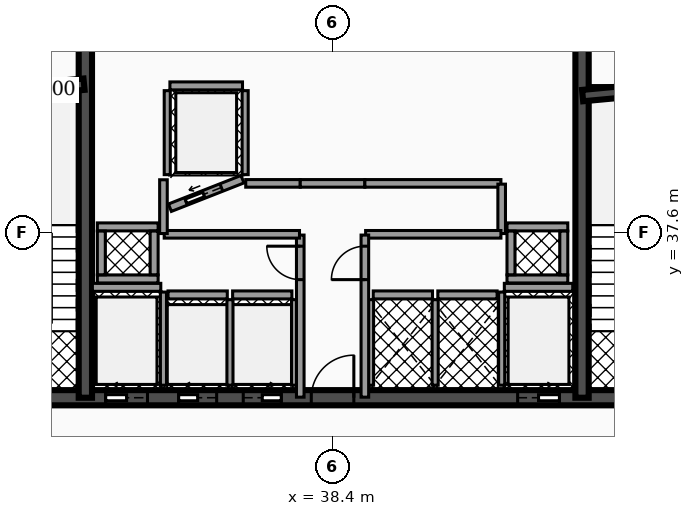
"""IFC4 building model, lengths in metres.
Left out: names, types, materials, properties, quantities, classifications, styles, units other than length and angle.
Written with IfcOpenShell. Run it as: python <this file> out.ifc"""

import sys

from ifc_helpers import new_model, si_unit, direction, frame, frame_2d, origin, place, context, subcontext, project, spatial, rectangle, extrude, element, fill, save


model = new_model("IFC4")
c1 = context("Model", 3, precision=1e-05, world=origin(), true_north=direction((0.0, 1.0)))
c2 = subcontext(c1, "Body", "Model", "MODEL_VIEW")
j1 = project(units=[si_unit("LENGTHUNIT", "METRE"), si_unit("PLANEANGLEUNIT", "RADIAN")], contexts=[c1])
p1 = place(None, origin())
s1 = spatial("IfcSite", under=j1, at=p1, CompositionType="ELEMENT")
p2 = place(p1, origin())
s2 = spatial("IfcBuilding", under=s1, at=p2, CompositionType="ELEMENT")
p3 = place(p2, frame((0.0, 0.0, 179.52)))
s3 = spatial("IfcBuildingStorey", under=s2, at=p3, CompositionType="ELEMENT", Elevation=179.52)
p4 = place(p3, frame((28.4, 33.25, 0.0), z_axis=(0.0, 0.0, 1.0), x_axis=(1.0, 0.0, 0.0)))
e1 = element("IfcWall", 1, at=p4, inside=s3, PredefinedType="SHEAR", context=c2, shape_type="SweptSolid", body=[
    extrude(rectangle(XDim=20.06, YDim=0.4, at=frame_2d((10.03, 0.0))), origin(), (0.0, 0.0, 1.0), 3.5),
])
p5 = place(p4, frame((4.03, 0.0, 0.0)))
e2 = element("IfcOpeningElement", 2, at=p5, cuts=e1, PredefinedType="OPENING", context=c2, shape_type="SweptSolid", body=[
    extrude(rectangle(XDim=1.1, YDim=2.15, at=frame_2d((0.55, 1.075))), frame((0.0, 0.21, 0.0), z_axis=(0.0, -1.0, 0.0), x_axis=(1.0, 0.0, 0.0)), (0.0, 0.0, 1.0), 0.42),
])
p6 = place(p4, frame((14.87, 0.0, 0.0)))
e3 = element("IfcOpeningElement", 3, at=p6, cuts=e1, PredefinedType="OPENING", context=c2, shape_type="SweptSolid", body=[
    extrude(rectangle(XDim=1.1, YDim=2.15, at=frame_2d((0.55, 1.075))), frame((0.0, 0.21, 0.0), z_axis=(0.0, -1.0, 0.0), x_axis=(1.0, 0.0, 0.0)), (0.0, 0.0, 1.0), 0.42),
])
p7 = place(p4, frame((5.95, 0.0, 0.0)))
e4 = element("IfcOpeningElement", 4, at=p7, cuts=e1, PredefinedType="OPENING", context=c2, shape_type="SweptSolid", body=[
    extrude(rectangle(XDim=1.0, YDim=2.1, at=frame_2d((0.5, 1.05))), frame((0.0, 0.21, 0.0), z_axis=(0.0, -1.0, 0.0), x_axis=(1.0, 0.0, 0.0)), (0.0, 0.0, 1.0), 0.42),
])
p8 = place(p4, frame((7.65, 0.0, 0.0)))
e5 = element("IfcOpeningElement", 5, at=p8, cuts=e1, PredefinedType="OPENING", context=c2, shape_type="SweptSolid", body=[
    extrude(rectangle(XDim=1.0, YDim=2.1, at=frame_2d((0.5, 1.05))), frame((0.0, 0.21, 0.0), z_axis=(0.0, -1.0, 0.0), x_axis=(1.0, 0.0, 0.0)), (0.0, 0.0, 1.0), 0.42),
])
p9 = place(p4, frame((1.31, 0.0, 0.0)))
e6 = element("IfcOpeningElement", 6, at=p9, cuts=e1, PredefinedType="OPENING", context=c2, shape_type="SweptSolid", body=[
    extrude(rectangle(XDim=1.1, YDim=2.2, at=frame_2d((0.55, 1.1))), frame((0.0, 0.21, 0.0), z_axis=(0.0, -1.0, 0.0), x_axis=(1.0, 0.0, 0.0)), (0.0, 0.0, 1.0), 0.42),
])
p10 = place(p4, frame((9.44, 0.0, 0.0)))
e7 = element("IfcOpeningElement", 7, at=p10, cuts=e1, PredefinedType="OPENING", context=c2, shape_type="SweptSolid", body=[
    extrude(rectangle(XDim=1.12, YDim=2.05, at=frame_2d((0.56, 1.025))), frame((0.0, 0.21, 0.0), z_axis=(0.0, -1.0, 0.0), x_axis=(1.0, 0.0, 0.0)), (0.0, 0.0, 1.0), 0.42),
])
p11 = place(p4, frame((17.65, 0.0, 0.0)))
e8 = element("IfcOpeningElement", 8, at=p11, cuts=e1, PredefinedType="OPENING", context=c2, shape_type="SweptSolid", body=[
    extrude(rectangle(XDim=1.1, YDim=2.2, at=frame_2d((0.55, 1.1))), frame((0.0, 0.21, 0.0), z_axis=(0.0, -1.0, 0.0), x_axis=(1.0, 0.0, 0.0)), (0.0, 0.0, 1.0), 0.42),
])
for number, where, z_axis, x_axis in (
    (9, (31.895, 33.25, 0.0), (0.0, 0.0, 1.0), (0.0, 1.0, 0.0)),
    (10, (44.965, 33.25, 0.0), (0.0, 0.0, 1.0), (0.0, 1.0, 0.0)),
):
    element("IfcWall", number, at=place(p3, frame(where, z_axis=z_axis, x_axis=x_axis)), inside=s3, PredefinedType="SHEAR", context=c2, shape_type="SweptSolid", body=[
        extrude(rectangle(XDim=10.2, YDim=0.35, at=frame_2d((5.1, 0.0))), origin(), (0.0, 0.0, 1.0), 3.5),
    ])
p12 = place(p3, frame((28.64, 41.2, 0.0), z_axis=(0.0, 0.0, 1.0), x_axis=(0.995687118776, 0.092774789157, 0.0)))
e11 = element("IfcWall", 11, at=p12, inside=s3, PredefinedType="SHEAR", context=c2, shape_type="SweptSolid", body=[
    extrude(rectangle(XDim=3.234, YDim=0.3, at=frame_2d((1.617, 0.0))), origin(), (0.0, 0.0, 1.0), 3.5),
])
p13 = place(p3, frame((44.98, 41.2, 0.0), z_axis=(0.0, 0.0, 1.0), x_axis=(0.995686468965, 0.09278176286, 0.0)))
e12 = element("IfcWall", 12, at=p13, inside=s3, PredefinedType="SHEAR", context=c2, shape_type="SweptSolid", body=[
    extrude(rectangle(XDim=3.234, YDim=0.3, at=frame_2d((1.617, 0.0))), origin(), (0.0, 0.0, 1.0), 3.5),
])
p14 = place(p3, frame((32.08, 36.155, 0.0), z_axis=(0.0, 0.0, 1.0), x_axis=(1.0, 0.0, 0.0)))
e13 = element("IfcWall", 13, at=p14, inside=s3, PredefinedType="SOLIDWALL", context=c2, shape_type="SweptSolid", body=[
    extrude(rectangle(XDim=1.8, YDim=0.21, at=frame_2d((0.9, 0.0))), origin(), (0.0, 0.0, 1.0), 2.472),
])
p15 = place(p3, frame((33.95, 33.58, 0.0), z_axis=(0.0, 0.0, 1.0), x_axis=(0.0, 1.0, 0.0)))
e14 = element("IfcWall", 14, at=p15, inside=s3, PredefinedType="SOLIDWALL", context=c2, shape_type="SweptSolid", body=[
    extrude(rectangle(XDim=2.45, YDim=0.16, at=frame_2d((1.225, 0.0))), origin(), (0.0, 0.0, 1.0), 2.472),
])
p16 = place(p3, frame((42.92, 36.155, 0.0), z_axis=(0.0, 0.0, 1.0), x_axis=(1.0, 0.0, 0.0)))
e15 = element("IfcWall", 15, at=p16, inside=s3, PredefinedType="SOLIDWALL", context=c2, shape_type="SweptSolid", body=[
    extrude(rectangle(XDim=1.8, YDim=0.21, at=frame_2d((0.9, 0.0))), origin(), (0.0, 0.0, 1.0), 2.472),
])
p17 = place(p3, frame((42.85, 33.58, 0.0), z_axis=(0.0, 0.0, 1.0), x_axis=(0.0, 1.0, 0.0)))
e16 = element("IfcWall", 16, at=p17, inside=s3, PredefinedType="SOLIDWALL", context=c2, shape_type="SweptSolid", body=[
    extrude(rectangle(XDim=2.45, YDim=0.16, at=frame_2d((1.225, 0.0))), origin(), (0.0, 0.0, 1.0), 2.472),
])
p18 = place(p3, frame((34.07, 35.955, 0.0), z_axis=(0.0, 0.0, 1.0), x_axis=(1.0, 0.0, 0.0)))
e17 = element("IfcWall", 17, at=p18, inside=s3, PredefinedType="SOLIDWALL", context=c2, shape_type="SweptSolid", body=[
    extrude(rectangle(XDim=1.56, YDim=0.21, at=frame_2d((0.78, 0.0))), origin(), (0.0, 0.0, 1.0), 2.472),
])
p19 = place(p3, frame((35.7, 33.58, 0.0), z_axis=(0.0, 0.0, 1.0), x_axis=(0.0, 1.0, 0.0)))
e18 = element("IfcWall", 18, at=p19, inside=s3, PredefinedType="SOLIDWALL", context=c2, shape_type="SweptSolid", body=[
    extrude(rectangle(XDim=2.25, YDim=0.16, at=frame_2d((1.125, 0.0))), origin(), (0.0, 0.0, 1.0), 2.472),
])
p20 = place(p3, frame((35.77, 35.955, 0.0), z_axis=(0.0, 0.0, 1.0), x_axis=(1.0, 0.0, 0.0)))
e19 = element("IfcWall", 19, at=p20, inside=s3, PredefinedType="SOLIDWALL", context=c2, shape_type="SweptSolid", body=[
    extrude(rectangle(XDim=1.56, YDim=0.21, at=frame_2d((0.78, 0.0))), origin(), (0.0, 0.0, 1.0), 2.472),
])
p21 = place(p3, frame((37.4, 33.58, 0.0), z_axis=(0.0, 0.0, 1.0), x_axis=(0.0, 1.0, 0.0)))
e20 = element("IfcWall", 20, at=p21, inside=s3, PredefinedType="SOLIDWALL", context=c2, shape_type="SweptSolid", body=[
    extrude(rectangle(XDim=2.25, YDim=0.16, at=frame_2d((1.125, 0.0))), origin(), (0.0, 0.0, 1.0), 2.472),
])
p22 = place(p3, frame((34.12, 38.25, 0.0), z_axis=(0.0, 0.0, 1.0), x_axis=(0.930804993012, 0.36551616241, 0.0)))
e21 = element("IfcWall", 21, at=p22, inside=s3, PredefinedType="SOLIDWALL", context=c2, shape_type="SweptSolid", body=[
    extrude(rectangle(XDim=2.052, YDim=0.21, at=frame_2d((1.026, 0.0))), origin(), (0.0, 0.0, 1.0), 2.472),
])
p23 = place(p22, frame((0.455, 0.0, 0.0)))
e22 = element("IfcOpeningElement", 22, at=p23, cuts=e21, PredefinedType="OPENING", context=c2, shape_type="SweptSolid", body=[
    extrude(rectangle(XDim=1.0, YDim=2.1, at=frame_2d((0.5, 1.05))), frame((0.0, 0.115, 0.0), z_axis=(0.0, -1.0, 0.0), x_axis=(1.0, 0.0, 0.0)), (0.0, 0.0, 1.0), 0.23),
])
p24 = place(p3, frame((34.12, 41.455, 0.0), z_axis=(0.0, 0.0, 1.0), x_axis=(1.0, 0.0, 0.0)))
e23 = element("IfcWall", 23, at=p24, inside=s3, PredefinedType="SOLIDWALL", context=c2, shape_type="SweptSolid", body=[
    extrude(rectangle(XDim=1.91, YDim=0.21, at=frame_2d((0.955, 0.0))), origin(), (0.0, 0.0, 1.0), 2.472),
])
for number, where, z_axis, x_axis in (
    (24, (34.05, 39.12, 0.0), (0.0, 0.0, 1.0), (0.0, 1.0, 0.0)),
    (25, (36.1, 39.12, 0.0), (0.0, 0.0, 1.0), (0.0, 1.0, 0.0)),
):
    element("IfcWall", number, at=place(p3, frame(where, z_axis=z_axis, x_axis=x_axis)), inside=s3, PredefinedType="SOLIDWALL", context=c2, shape_type="SweptSolid", body=[
        extrude(rectangle(XDim=2.21, YDim=0.16, at=frame_2d((1.105, 0.0))), origin(), (0.0, 0.0, 1.0), 2.472),
    ])
p25 = place(p3, frame((39.47, 35.955, 0.0), z_axis=(0.0, 0.0, 1.0), x_axis=(1.0, 0.0, 0.0)))
e26 = element("IfcWall", 26, at=p25, inside=s3, PredefinedType="SOLIDWALL", context=c2, shape_type="SweptSolid", body=[
    extrude(rectangle(XDim=1.56, YDim=0.21, at=frame_2d((0.78, 0.0))), origin(), (0.0, 0.0, 1.0), 2.472),
])
for number, where, z_axis, x_axis in (
    (27, (39.4, 33.58, 0.0), (0.0, 0.0, 1.0), (0.0, 1.0, 0.0)),
    (28, (41.1, 33.58, 0.0), (0.0, 0.0, 1.0), (0.0, 1.0, 0.0)),
):
    element("IfcWall", number, at=place(p3, frame(where, z_axis=z_axis, x_axis=x_axis)), inside=s3, PredefinedType="SOLIDWALL", context=c2, shape_type="SweptSolid", body=[
        extrude(rectangle(XDim=2.25, YDim=0.16, at=frame_2d((1.125, 0.0))), origin(), (0.0, 0.0, 1.0), 2.472),
    ])
p26 = place(p3, frame((41.17, 35.955, 0.0), z_axis=(0.0, 0.0, 1.0), x_axis=(1.0, 0.0, 0.0)))
e29 = element("IfcWall", 29, at=p26, inside=s3, PredefinedType="SOLIDWALL", context=c2, shape_type="SweptSolid", body=[
    extrude(rectangle(XDim=1.56, YDim=0.21, at=frame_2d((0.78, 0.0))), origin(), (0.0, 0.0, 1.0), 2.472),
])
for number, where, z_axis, x_axis in (
    (30, (32.21, 36.375, 0.0), (0.0, 0.0, 1.0), (1.0, 0.0, 0.0)),
    (31, (32.21, 37.745, 0.0), (0.0, 0.0, 1.0), (1.0, 0.0, 0.0)),
):
    element("IfcWall", number, at=place(p3, frame(where, z_axis=z_axis, x_axis=x_axis)), inside=s3, PredefinedType="SOLIDWALL", context=c2, shape_type="SweptSolid", body=[
        extrude(rectangle(XDim=1.6, YDim=0.21, at=frame_2d((0.8, 0.0))), origin(), (0.0, 0.0, 1.0), 3.5),
    ])
for number, where, z_axis, x_axis in (
    (32, (32.315, 36.485, 0.0), (0.0, 0.0, 1.0), (0.0, 1.0, 0.0)),
    (33, (33.705, 36.485, 0.0), (0.0, 0.0, 1.0), (0.0, 1.0, 0.0)),
):
    element("IfcWall", number, at=place(p3, frame(where, z_axis=z_axis, x_axis=x_axis)), inside=s3, PredefinedType="SOLIDWALL", context=c2, shape_type="SweptSolid", body=[
        extrude(rectangle(XDim=1.15, YDim=0.21, at=frame_2d((0.575, 0.0))), origin(), (0.0, 0.0, 1.0), 3.5),
    ])
for number, where, z_axis, x_axis in (
    (34, (42.99, 36.375, 0.0), (0.0, 0.0, 1.0), (1.0, 0.0, 0.0)),
    (35, (42.99, 37.745, 0.0), (0.0, 0.0, 1.0), (1.0, 0.0, 0.0)),
):
    element("IfcWall", number, at=place(p3, frame(where, z_axis=z_axis, x_axis=x_axis)), inside=s3, PredefinedType="SOLIDWALL", context=c2, shape_type="SweptSolid", body=[
        extrude(rectangle(XDim=1.6, YDim=0.21, at=frame_2d((0.8, 0.0))), origin(), (0.0, 0.0, 1.0), 3.5),
    ])
for number, where, z_axis, x_axis in (
    (36, (43.095, 36.485, 0.0), (0.0, 0.0, 1.0), (0.0, 1.0, 0.0)),
    (37, (44.485, 36.485, 0.0), (0.0, 0.0, 1.0), (0.0, 1.0, 0.0)),
):
    element("IfcWall", number, at=place(p3, frame(where, z_axis=z_axis, x_axis=x_axis)), inside=s3, PredefinedType="SOLIDWALL", context=c2, shape_type="SweptSolid", body=[
        extrude(rectangle(XDim=1.15, YDim=0.21, at=frame_2d((0.575, 0.0))), origin(), (0.0, 0.0, 1.0), 3.5),
    ])
p27 = place(p3, frame((37.55, 33.265, 0.0), z_axis=(0.0, 0.0, 1.0), x_axis=(0.0, 1.0, 0.0)))
e38 = element("IfcWall", 38, at=p27, inside=s3, PredefinedType="PARTITIONING", context=c2, shape_type="SweptSolid", body=[
    extrude(rectangle(XDim=4.265, YDim=0.2, at=frame_2d((2.133, 0.0))), origin(), (0.0, 0.0, 1.0), 2.457),
])
p28 = place(p27, frame((3.093, 0.0, 0.0)))
e39 = element("IfcOpeningElement", 39, at=p28, cuts=e38, PredefinedType="OPENING", context=c2, shape_type="SweptSolid", body=[
    extrude(rectangle(XDim=0.88, YDim=2.05, at=frame_2d((0.44, 1.025))), frame((0.0, 0.11, 0.0), z_axis=(0.0, -1.0, 0.0), x_axis=(1.0, 0.0, 0.0)), (0.0, 0.0, 1.0), 0.22),
])
p29 = place(p3, frame((33.97, 37.55, 0.0), z_axis=(0.0, 0.0, 1.0), x_axis=(1.0, 0.0, 0.0)))
e40 = element("IfcWall", 40, at=p29, inside=s3, PredefinedType="PARTITIONING", context=c2, shape_type="SweptSolid", body=[
    extrude(rectangle(XDim=3.56, YDim=0.2, at=frame_2d((1.78, 0.0))), origin(), (0.0, 0.0, 1.0), 2.457),
])
p30 = place(p3, frame((33.95, 37.57, 0.0), z_axis=(0.0, 0.0, 1.0), x_axis=(0.0, 1.0, 0.0)))
e41 = element("IfcWall", 41, at=p30, inside=s3, PredefinedType="PARTITIONING", context=c2, shape_type="SweptSolid", body=[
    extrude(rectangle(XDim=1.415, YDim=0.2, at=frame_2d((0.708, 0.0))), origin(), (0.0, 0.0, 1.0), 2.457),
])
p31 = place(p3, frame((36.115, 38.89, 0.0), z_axis=(0.0, 0.0, 1.0), x_axis=(1.0, 0.0, 0.0)))
e42 = element("IfcWall", 42, at=p31, inside=s3, PredefinedType="PARTITIONING", context=c2, shape_type="SweptSolid", body=[
    extrude(rectangle(XDim=1.435, YDim=0.2, at=frame_2d((0.718, 0.0))), origin(), (0.0, 0.0, 1.0), 2.457),
])
p32 = place(p3, frame((37.55, 38.89, 0.0), z_axis=(0.0, 0.0, 1.0), x_axis=(1.0, 0.0, 0.0)))
e43 = element("IfcWall", 43, at=p32, inside=s3, PredefinedType="PARTITIONING", context=c2, shape_type="SweptSolid", body=[
    extrude(rectangle(XDim=1.7, YDim=0.2, at=frame_2d((0.85, 0.0))), origin(), (0.0, 0.0, 1.0), 2.457),
])
p33 = place(p3, frame((39.25, 38.89, 0.0), z_axis=(0.0, 0.0, 1.0), x_axis=(1.0, 0.0, 0.0)))
e44 = element("IfcWall", 44, at=p33, inside=s3, PredefinedType="PARTITIONING", context=c2, shape_type="SweptSolid", body=[
    extrude(rectangle(XDim=3.58, YDim=0.2, at=frame_2d((1.79, 0.0))), origin(), (0.0, 0.0, 1.0), 2.457),
])
p34 = place(p3, frame((42.85, 37.57, 0.0), z_axis=(0.0, 0.0, 1.0), x_axis=(0.0, 1.0, 0.0)))
e45 = element("IfcWall", 45, at=p34, inside=s3, PredefinedType="PARTITIONING", context=c2, shape_type="SweptSolid", body=[
    extrude(rectangle(XDim=1.3, YDim=0.2, at=frame_2d((0.65, 0.0))), origin(), (0.0, 0.0, 1.0), 2.457),
])
p35 = place(p3, frame((39.27, 37.55, 0.0), z_axis=(0.0, 0.0, 1.0), x_axis=(1.0, 0.0, 0.0)))
e46 = element("IfcWall", 46, at=p35, inside=s3, PredefinedType="PARTITIONING", context=c2, shape_type="SweptSolid", body=[
    extrude(rectangle(XDim=3.56, YDim=0.2, at=frame_2d((1.78, 0.0))), origin(), (0.0, 0.0, 1.0), 2.457),
])
p36 = place(p3, frame((39.25, 33.265, 0.0), z_axis=(0.0, 0.0, 1.0), x_axis=(0.0, 1.0, 0.0)))
e47 = element("IfcWall", 47, at=p36, inside=s3, PredefinedType="PARTITIONING", context=c2, shape_type="SweptSolid", body=[
    extrude(rectangle(XDim=4.265, YDim=0.2, at=frame_2d((2.133, 0.0))), origin(), (0.0, 0.0, 1.0), 2.457),
])
p37 = place(p36, frame((3.093, 0.0, 0.0)))
e48 = element("IfcOpeningElement", 48, at=p37, cuts=e47, PredefinedType="OPENING", context=c2, shape_type="SweptSolid", body=[
    extrude(rectangle(XDim=0.88, YDim=2.05, at=frame_2d((0.44, 1.025))), frame((0.0, 0.11, 0.0), z_axis=(0.0, -1.0, 0.0), x_axis=(1.0, 0.0, 0.0)), (0.0, 0.0, 1.0), 0.22),
])
p38 = place(p5, origin())
e49 = element("IfcDoor", 49, at=p38, inside=s3, OperationType="SLIDING_TO_LEFT", PredefinedType="DOOR", context=c2, shape_type="SweptSolid", body=[
    extrude(rectangle(XDim=1.1, YDim=2.15, at=frame_2d((0.55, 1.075))), frame((0.0, 0.025, 0.0), z_axis=(0.0, -1.0, 0.0), x_axis=(1.0, 0.0, 0.0)), (0.0, 0.0, 1.0), 0.05),
])
fill(e2, e49)
p39 = place(p6, origin())
e50 = element("IfcDoor", 50, at=p39, inside=s3, OperationType="SLIDING_TO_RIGHT", PredefinedType="DOOR", context=c2, shape_type="SweptSolid", body=[
    extrude(rectangle(XDim=1.1, YDim=2.15, at=frame_2d((0.55, 1.075))), frame((0.0, 0.025, 0.0), z_axis=(0.0, -1.0, 0.0), x_axis=(1.0, 0.0, 0.0)), (0.0, 0.0, 1.0), 0.05),
])
fill(e3, e50)
p40 = place(p7, origin())
e51 = element("IfcDoor", 51, at=p40, inside=s3, OperationType="SLIDING_TO_LEFT", PredefinedType="DOOR", context=c2, shape_type="SweptSolid", body=[
    extrude(rectangle(XDim=1.0, YDim=2.1, at=frame_2d((0.5, 1.05))), frame((0.0, 0.025, 0.0), z_axis=(0.0, -1.0, 0.0), x_axis=(1.0, 0.0, 0.0)), (0.0, 0.0, 1.0), 0.05),
])
fill(e4, e51)
p41 = place(p8, origin())
e52 = element("IfcDoor", 52, at=p41, inside=s3, OperationType="SLIDING_TO_RIGHT", PredefinedType="DOOR", context=c2, shape_type="SweptSolid", body=[
    extrude(rectangle(XDim=1.0, YDim=2.1, at=frame_2d((0.5, 1.05))), frame((0.0, 0.025, 0.0), z_axis=(0.0, -1.0, 0.0), x_axis=(1.0, 0.0, 0.0)), (0.0, 0.0, 1.0), 0.05),
])
fill(e5, e52)
p42 = place(p23, origin())
e53 = element("IfcDoor", 53, at=p42, inside=s3, OperationType="SLIDING_TO_LEFT", PredefinedType="DOOR", context=c2, shape_type="SweptSolid", body=[
    extrude(rectangle(XDim=1.0, YDim=2.1, at=frame_2d((0.5, 1.05))), frame((0.0, 0.025, 0.0), z_axis=(0.0, -1.0, 0.0), x_axis=(1.0, 0.0, 0.0)), (0.0, 0.0, 1.0), 0.05),
])
fill(e22, e53)
p43 = place(p10, origin())
e54 = element("IfcDoor", 54, at=p43, inside=s3, OperationType="SINGLE_SWING_RIGHT", PredefinedType="DOOR", context=c2, shape_type="SweptSolid", body=[
    extrude(rectangle(XDim=1.12, YDim=2.05, at=frame_2d((0.56, 1.025))), frame((0.0, 0.025, 0.0), z_axis=(0.0, -1.0, 0.0), x_axis=(1.0, 0.0, 0.0)), (0.0, 0.0, 1.0), 0.05),
])
fill(e7, e54)
p44 = place(p28, origin())
e55 = element("IfcDoor", 55, at=p44, inside=s3, OperationType="SINGLE_SWING_RIGHT", PredefinedType="DOOR", context=c2, shape_type="SweptSolid", body=[
    extrude(rectangle(XDim=0.88, YDim=2.05, at=frame_2d((0.44, 1.025))), frame((0.0, 0.025, 0.0), z_axis=(0.0, -1.0, 0.0), x_axis=(1.0, 0.0, 0.0)), (0.0, 0.0, 1.0), 0.05),
])
fill(e39, e55)
p45 = place(p37, origin())
e56 = element("IfcDoor", 56, at=p45, inside=s3, OperationType="SINGLE_SWING_LEFT", PredefinedType="DOOR", context=c2, shape_type="SweptSolid", body=[
    extrude(rectangle(XDim=0.88, YDim=2.05, at=frame_2d((0.44, 1.025))), frame((0.0, 0.025, 0.0), z_axis=(0.0, -1.0, 0.0), x_axis=(1.0, 0.0, 0.0)), (0.0, 0.0, 1.0), 0.05),
])
fill(e48, e56)
save(model, sys.argv[1])
